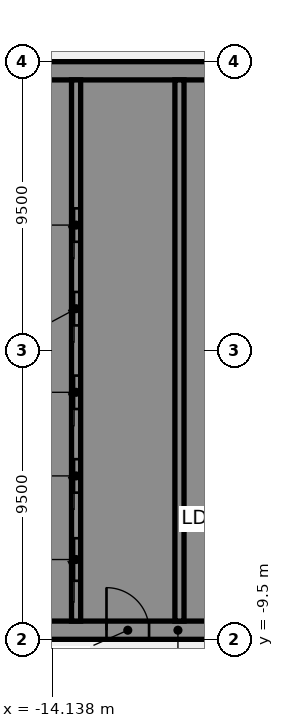
"""IFC4 building model, lengths in metres.
Left out: names, types, materials, properties, quantities, classifications, styles, units other than length and angle.
Written with IfcOpenShell. Run it as: python <this file> out.ifc"""

import sys

from ifc_helpers import new_model, si_unit, direction, frame, frame_2d, origin, place, context, subcontext, project, spatial, polyline, rectangle, outline, extrude, element, fill, save


model = new_model("IFC4")
c1 = context("Model", 3, precision=1e-05, world=origin(), true_north=direction((0.0, 1.0)))
c2 = subcontext(c1, "Body", "Model", "MODEL_VIEW")
j1 = project(units=[si_unit("LENGTHUNIT", "METRE"), si_unit("PLANEANGLEUNIT", "RADIAN")], contexts=[c1])
p1 = place(None, origin())
s1 = spatial("IfcSite", under=j1, at=p1, CompositionType="ELEMENT")
p2 = place(p1, origin())
s2 = spatial("IfcBuilding", under=s1, at=p2, CompositionType="ELEMENT")
p3 = place(p2, frame((0.0, 0.0, 94.75)))
s3 = spatial("IfcBuildingStorey", under=s2, at=p3, CompositionType="ELEMENT", Elevation=94.75)
p4 = place(p3, frame((-16.5, -9.2, 0.0), z_axis=(0.0, 0.0, 1.0), x_axis=(1.0, 0.0, 0.0)))
e1 = element("IfcWall", 1, at=p4, inside=s3, PredefinedType="SHEAR", context=c2, shape_type="SweptSolid", body=[
    extrude(rectangle(XDim=13.0, YDim=0.6, at=frame_2d((6.5, 0.0))), origin(), (0.0, 0.0, 1.0), 3.61),
])
p5 = place(p4, frame((4.15, 0.0, 0.0)))
e2 = element("IfcOpeningElement", 2, at=p5, cuts=e1, PredefinedType="OPENING", context=c2, shape_type="SweptSolid", body=[
    extrude(rectangle(XDim=1.4, YDim=2.1, at=frame_2d((0.7, 1.05))), frame((0.0, 0.31, 0.0), z_axis=(0.0, -1.0, 0.0), x_axis=(1.0, 0.0, 0.0)), (0.0, 0.0, 1.0), 0.62),
])
p6 = place(p4, frame((10.125, 0.0, 0.0)))
e3 = element("IfcOpeningElement", 3, at=p6, cuts=e1, PredefinedType="OPENING", context=c2, shape_type="SweptSolid", body=[
    extrude(rectangle(XDim=1.4, YDim=2.1, at=frame_2d((0.7, 1.05))), frame((0.0, 0.31, 0.0), z_axis=(0.0, -1.0, 0.0), x_axis=(1.0, 0.0, 0.0)), (0.0, 0.0, 1.0), 0.62),
])
p7 = place(p3, origin())
e4 = element("IfcWall", 4, at=p7, inside=s3, PredefinedType="SHEAR", context=c2, shape_type="SweptSolid", body=[
    extrude(outline(polyline([(-13.5, -8.9), (-13.5, -8.125), (-15.9, -8.125), (-15.9, -5.625), (-13.5, -5.625), (-13.5, -5.375), (-15.9, -5.375), (-15.9, -2.875), (-13.5, -2.875), (-13.5, -2.625), (-15.9, -2.625), (-15.9, -0.125), (-13.5, -0.125), (-13.5, 0.125), (-15.9, 0.125), (-15.9, 2.625), (-13.5, 2.625), (-13.5, 2.875), (-15.9, 2.875), (-15.9, 5.375), (-13.5, 5.375), (-13.5, 5.625), (-15.9, 5.625), (-15.9, 8.125), (-13.5, 8.125), (-13.5, 8.9), (-15.9, 8.9), (-16.5, 8.9), (-16.5, -8.9), (-15.9, -8.9), (-13.5, -8.9)])), origin(), (0.0, 0.0, 1.0), 3.61),
])
p8 = place(p3, frame((-16.5, 9.2, 0.0), z_axis=(0.0, 0.0, 1.0), x_axis=(1.0, 0.0, 0.0)))
e5 = element("IfcWall", 5, at=p8, inside=s3, PredefinedType="SHEAR", context=c2, shape_type="SweptSolid", body=[
    extrude(rectangle(XDim=13.0, YDim=0.6, at=frame_2d((6.5, 0.0))), origin(), (0.0, 0.0, 1.0), 3.61),
])
p9 = place(p3, origin())
e6 = element("IfcWall", 6, at=p9, inside=s3, PredefinedType="SHEAR", context=c2, shape_type="SweptSolid", body=[
    extrude(outline(polyline([(-9.8, -5.375), (-9.8, -5.625), (-7.5, -5.625), (-7.2, -5.625), (-7.2, 8.9), (-7.5, 8.9), (-9.8, 8.9), (-9.8, 8.125), (-7.5, 8.125), (-7.5, 5.625), (-9.8, 5.625), (-9.8, 5.375), (-7.5, 5.375), (-7.5, 2.875), (-9.8, 2.875), (-9.8, 2.625), (-7.5, 2.625), (-7.5, 0.125), (-9.8, 0.125), (-9.8, -0.125), (-7.5, -0.125), (-7.5, -2.625), (-9.8, -2.625), (-9.8, -2.875), (-7.5, -2.875), (-7.5, -5.375), (-9.8, -5.375)])), origin(), (0.0, 0.0, 1.0), 3.61),
])
p10 = place(p3, origin())
e7 = element("IfcWall", 7, at=p10, inside=s3, PredefinedType="SHEAR", context=c2, shape_type="SweptSolid", body=[
    extrude(outline(polyline([(-7.5, -8.125), (-9.55, -8.125), (-9.55, -5.625), (-9.8, -5.625), (-9.8, -8.125), (-9.8, -8.9), (-7.5, -8.9), (-7.5, -8.125)])), origin(), (0.0, 0.0, 1.0), 3.61),
])
p11 = place(p3, frame((-13.35, -8.9, 0.0), z_axis=(0.0, 0.0, 1.0), x_axis=(0.0, 1.0, 0.0)))
e8 = element("IfcWall", 8, at=p11, inside=s3, PredefinedType="SHEAR", context=c2, shape_type="SweptSolid", body=[
    extrude(rectangle(XDim=17.8, YDim=0.3, at=frame_2d((8.9, 0.0))), origin(), (0.0, 0.0, 1.0), 3.61),
])
p12 = place(p11, frame((1.325, 0.0, 0.0)))
e9 = element("IfcOpeningElement", 9, at=p12, cuts=e8, PredefinedType="OPENING", context=c2, shape_type="SweptSolid", body=[
    extrude(rectangle(XDim=1.4, YDim=2.1, at=frame_2d((0.7, 1.05))), frame((0.0, 0.16, 0.0), z_axis=(0.0, -1.0, 0.0), x_axis=(1.0, 0.0, 0.0)), (0.0, 0.0, 1.0), 0.32),
])
p13 = place(p11, frame((4.225, 0.0, 0.0)))
e10 = element("IfcOpeningElement", 10, at=p13, cuts=e8, PredefinedType="OPENING", context=c2, shape_type="SweptSolid", body=[
    extrude(rectangle(XDim=1.1, YDim=2.1, at=frame_2d((0.55, 1.05))), frame((0.0, 0.16, 0.0), z_axis=(0.0, -1.0, 0.0), x_axis=(1.0, 0.0, 0.0)), (0.0, 0.0, 1.0), 0.32),
])
p14 = place(p11, frame((6.975, 0.0, 0.0)))
e11 = element("IfcOpeningElement", 11, at=p14, cuts=e8, PredefinedType="OPENING", context=c2, shape_type="SweptSolid", body=[
    extrude(rectangle(XDim=1.1, YDim=2.1, at=frame_2d((0.55, 1.05))), frame((0.0, 0.16, 0.0), z_axis=(0.0, -1.0, 0.0), x_axis=(1.0, 0.0, 0.0)), (0.0, 0.0, 1.0), 0.32),
])
p15 = place(p11, frame((9.725, 0.0, 0.0)))
e12 = element("IfcOpeningElement", 12, at=p15, cuts=e8, PredefinedType="OPENING", context=c2, shape_type="SweptSolid", body=[
    extrude(rectangle(XDim=1.1, YDim=2.1, at=frame_2d((0.55, 1.05))), frame((0.0, 0.16, 0.0), z_axis=(0.0, -1.0, 0.0), x_axis=(1.0, 0.0, 0.0)), (0.0, 0.0, 1.0), 0.32),
])
p16 = place(p11, frame((12.475, 0.0, 0.0)))
e13 = element("IfcOpeningElement", 13, at=p16, cuts=e8, PredefinedType="OPENING", context=c2, shape_type="SweptSolid", body=[
    extrude(rectangle(XDim=1.1, YDim=2.1, at=frame_2d((0.55, 1.05))), frame((0.0, 0.16, 0.0), z_axis=(0.0, -1.0, 0.0), x_axis=(1.0, 0.0, 0.0)), (0.0, 0.0, 1.0), 0.32),
])
p17 = place(p3, frame((-9.95, -8.9, 0.0), z_axis=(0.0, 0.0, 1.0), x_axis=(0.0, 1.0, 0.0)))
e14 = element("IfcWall", 14, at=p17, inside=s3, PredefinedType="SHEAR", context=c2, shape_type="SweptSolid", body=[
    extrude(rectangle(XDim=17.8, YDim=0.3, at=frame_2d((8.9, 0.0))), origin(), (0.0, 0.0, 1.0), 3.61),
])
p18 = place(p5, origin())
e15 = element("IfcDoor", 15, at=p18, inside=s3, OperationType="SINGLE_SWING_LEFT", PredefinedType="DOOR", context=c2, shape_type="SweptSolid", body=[
    extrude(rectangle(XDim=1.4, YDim=2.1, at=frame_2d((0.7, 1.05))), frame((0.0, 0.025, 0.0), z_axis=(0.0, -1.0, 0.0), x_axis=(1.0, 0.0, 0.0)), (0.0, 0.0, 1.0), 0.05),
])
fill(e2, e15)
p19 = place(p12, origin())
e16 = element("IfcDoor", 16, at=p19, inside=s3, OperationType="SLIDING_TO_LEFT", PredefinedType="DOOR", context=c2, shape_type="SweptSolid", body=[
    extrude(rectangle(XDim=1.4, YDim=2.1, at=frame_2d((0.7, 1.05))), frame((0.0, 0.025, 0.0), z_axis=(0.0, -1.0, 0.0), x_axis=(1.0, 0.0, 0.0)), (0.0, 0.0, 1.0), 0.05),
])
fill(e9, e16)
p20 = place(p13, origin())
e17 = element("IfcDoor", 17, at=p20, inside=s3, OperationType="SLIDING_TO_LEFT", PredefinedType="DOOR", context=c2, shape_type="SweptSolid", body=[
    extrude(rectangle(XDim=1.1, YDim=2.1, at=frame_2d((0.55, 1.05))), frame((0.0, 0.025, 0.0), z_axis=(0.0, -1.0, 0.0), x_axis=(1.0, 0.0, 0.0)), (0.0, 0.0, 1.0), 0.05),
])
fill(e10, e17)
p21 = place(p14, origin())
e18 = element("IfcDoor", 18, at=p21, inside=s3, OperationType="SLIDING_TO_LEFT", PredefinedType="DOOR", context=c2, shape_type="SweptSolid", body=[
    extrude(rectangle(XDim=1.1, YDim=2.1, at=frame_2d((0.55, 1.05))), frame((0.0, 0.025, 0.0), z_axis=(0.0, -1.0, 0.0), x_axis=(1.0, 0.0, 0.0)), (0.0, 0.0, 1.0), 0.05),
])
fill(e11, e18)
p22 = place(p15, origin())
e19 = element("IfcDoor", 19, at=p22, inside=s3, OperationType="SLIDING_TO_LEFT", PredefinedType="DOOR", context=c2, shape_type="SweptSolid", body=[
    extrude(rectangle(XDim=1.1, YDim=2.1, at=frame_2d((0.55, 1.05))), frame((0.0, 0.025, 0.0), z_axis=(0.0, -1.0, 0.0), x_axis=(1.0, 0.0, 0.0)), (0.0, 0.0, 1.0), 0.05),
])
fill(e12, e19)
p23 = place(p16, origin())
e20 = element("IfcDoor", 20, at=p23, inside=s3, OperationType="SLIDING_TO_LEFT", PredefinedType="DOOR", context=c2, shape_type="SweptSolid", body=[
    extrude(rectangle(XDim=1.1, YDim=2.1, at=frame_2d((0.55, 1.05))), frame((0.0, 0.025, 0.0), z_axis=(0.0, -1.0, 0.0), x_axis=(1.0, 0.0, 0.0)), (0.0, 0.0, 1.0), 0.05),
])
fill(e13, e20)
save(model, sys.argv[1])
